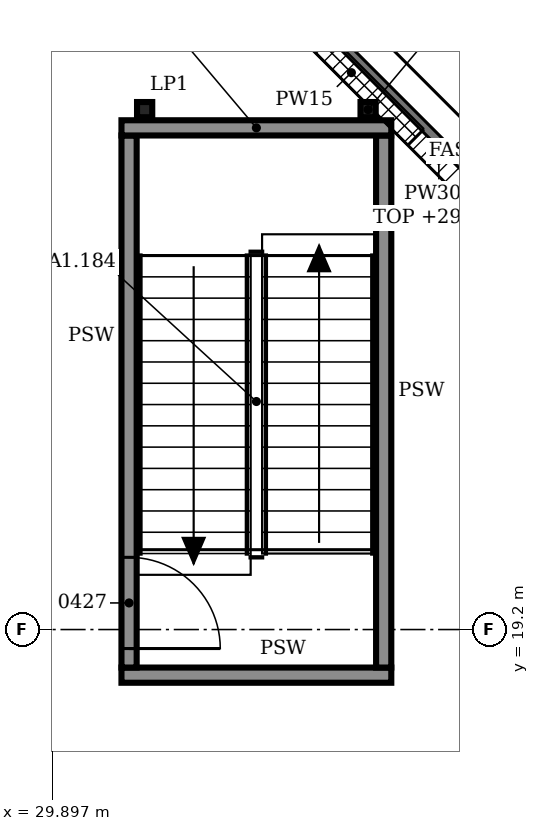
"""IFC4 building model, lengths in metres.
Left out: names, types, materials, properties, quantities, classifications, styles, units other than length and angle.
Written with IfcOpenShell. Run it as: python <this file> out.ifc"""

import sys

from ifc_helpers import new_model, si_unit, direction, frame, frame_2d, origin, origin_2d, place, context, subcontext, project, spatial, rectangle, i_section, extrude, element, fill, save


model = new_model("IFC4")
c1 = context("Model", 3, precision=1e-05, world=origin(), true_north=direction((0.0, 1.0)))
c2 = subcontext(c1, "Body", "Model", "MODEL_VIEW")
j1 = project(units=[si_unit("LENGTHUNIT", "METRE"), si_unit("PLANEANGLEUNIT", "RADIAN")], contexts=[c1])
p1 = place(None, origin())
s1 = spatial("IfcSite", under=j1, at=p1, CompositionType="ELEMENT")
p2 = place(p1, origin())
s2 = spatial("IfcBuilding", under=s1, at=p2, CompositionType="ELEMENT")
p3 = place(p2, frame((0.0, 0.0, 25.8)))
s3 = spatial("IfcBuildingStorey", under=s2, at=p3, CompositionType="ELEMENT", Elevation=25.8)
for number, where, z_axis, x_axis in (
    (1, (31.105, 26.04, 0.0), (0.0, 0.0, 1.0), (1.0, 0.0, 0.0)),
    (2, (34.045, 26.04, 0.0), (0.0, 0.0, 1.0), (1.0, 0.0, 0.0)),
):
    element("IfcColumn", number, at=place(p3, frame(where, z_axis=z_axis, x_axis=x_axis)), inside=s3, PredefinedType="COLUMN", context=c2, shape_type="SweptSolid", body=[
        extrude(i_section(OverallWidth=0.2, OverallDepth=0.2, WebThickness=0.009, FlangeThickness=0.015, FilletRadius=0.018, at=origin_2d()), origin(), (0.0, 0.0, 1.0), 4.8),
    ])
p4 = place(p3, frame((37.277, 23.075, 0.0), z_axis=(0.0, 0.0, 1.0), x_axis=(-0.707088024292, 0.707125537583, 0.0)))
e3 = element("IfcWall", 3, at=p4, inside=s3, PredefinedType="SOLIDWALL", context=c2, shape_type="SweptSolid", body=[
    extrude(rectangle(XDim=6.508, YDim=0.3, at=frame_2d((3.254, 0.0))), origin(), (0.0, 0.0, 1.0), 4.0),
])
p5 = place(p4, frame((0.427, 0.0, 0.9)))
e4 = element("IfcOpeningElement", 4, at=p5, cuts=e3, PredefinedType="OPENING", context=c2, shape_type="SweptSolid", body=[
    extrude(rectangle(XDim=2.4, YDim=1.5, at=frame_2d((1.2, 0.75))), frame((0.0, 0.16, 0.0), z_axis=(0.0, -1.0, 0.0), x_axis=(1.0, 0.0, 0.0)), (0.0, 0.0, 1.0), 0.32),
])
p6 = place(p4, frame((3.681, 0.0, 0.9)))
e5 = element("IfcOpeningElement", 5, at=p6, cuts=e3, PredefinedType="OPENING", context=c2, shape_type="SweptSolid", body=[
    extrude(rectangle(XDim=2.4, YDim=1.5, at=frame_2d((1.2, 0.75))), frame((0.0, 0.16, 0.0), z_axis=(0.0, -1.0, 0.0), x_axis=(1.0, 0.0, 0.0)), (0.0, 0.0, 1.0), 0.32),
])
p7 = place(p3, frame((30.8, 18.6, 0.0), z_axis=(0.0, 0.0, 1.0), x_axis=(1.0, 0.0, 0.0)))
e6 = element("IfcWall", 6, at=p7, inside=s3, PredefinedType="SOLIDWALL", context=c2, shape_type="SweptSolid", body=[
    extrude(rectangle(XDim=3.55, YDim=0.2, at=frame_2d((1.775, 0.0))), origin(), (0.0, 0.0, 1.0), 4.6),
])
p8 = place(p3, frame((30.9, 18.7, 0.0), z_axis=(0.0, 0.0, 1.0), x_axis=(0.0, 1.0, 0.0)))
e7 = element("IfcWall", 7, at=p8, inside=s3, PredefinedType="SOLIDWALL", context=c2, shape_type="SweptSolid", body=[
    extrude(rectangle(XDim=7.0, YDim=0.2, at=frame_2d((3.5, 0.0))), origin(), (0.0, 0.0, 1.0), 4.6),
])
p9 = place(p8, frame((0.25, 0.0, 0.0)))
e8 = element("IfcOpeningElement", 8, at=p9, cuts=e7, PredefinedType="OPENING", context=c2, shape_type="SweptSolid", body=[
    extrude(rectangle(XDim=1.2, YDim=2.1, at=frame_2d((0.6, 1.05))), frame((0.0, 0.11, 0.0), z_axis=(0.0, -1.0, 0.0), x_axis=(1.0, 0.0, 0.0)), (0.0, 0.0, 1.0), 0.22),
])
p10 = place(p3, frame((34.25, 18.7, 0.0), z_axis=(0.0, 0.0, 1.0), x_axis=(0.0, 1.0, 0.0)))
e9 = element("IfcWall", 9, at=p10, inside=s3, PredefinedType="SOLIDWALL", context=c2, shape_type="SweptSolid", body=[
    extrude(rectangle(XDim=7.0, YDim=0.2, at=frame_2d((3.5, 0.0))), origin(), (0.0, 0.0, 1.0), 4.6),
])
p11 = place(p3, frame((30.8, 25.8, 0.0), z_axis=(0.0, 0.0, 1.0), x_axis=(1.0, 0.0, 0.0)))
e10 = element("IfcWall", 10, at=p11, inside=s3, PredefinedType="SOLIDWALL", context=c2, shape_type="SweptSolid", body=[
    extrude(rectangle(XDim=3.55, YDim=0.2, at=frame_2d((1.775, 0.0))), origin(), (0.0, 0.0, 1.0), 4.6),
])
p12 = place(p6, origin())
e11 = element("IfcWindow", 11, at=p12, inside=s3, PartitioningType="SINGLE_PANEL", PredefinedType="WINDOW", context=c2, shape_type="SweptSolid", body=[
    extrude(rectangle(XDim=2.4, YDim=1.5, at=frame_2d((1.2, 0.75))), frame((0.0, 0.03, 0.0), z_axis=(0.0, -1.0, 0.0), x_axis=(1.0, 0.0, 0.0)), (0.0, 0.0, 1.0), 0.06),
])
fill(e5, e11)
p13 = place(p9, frame((1.2, 0.0, 0.0), z_axis=(0.0, 0.0, 1.0), x_axis=(-1.0, 0.0, 0.0)))
e12 = element("IfcDoor", 12, at=p13, inside=s3, OperationType="SINGLE_SWING_RIGHT", PredefinedType="DOOR", context=c2, shape_type="SweptSolid", body=[
    extrude(rectangle(XDim=1.2, YDim=2.1, at=frame_2d((0.6, 1.05))), frame((0.0, 0.025, 0.0), z_axis=(0.0, -1.0, 0.0), x_axis=(1.0, 0.0, 0.0)), (0.0, 0.0, 1.0), 0.05),
])
fill(e8, e12)
save(model, sys.argv[1])
